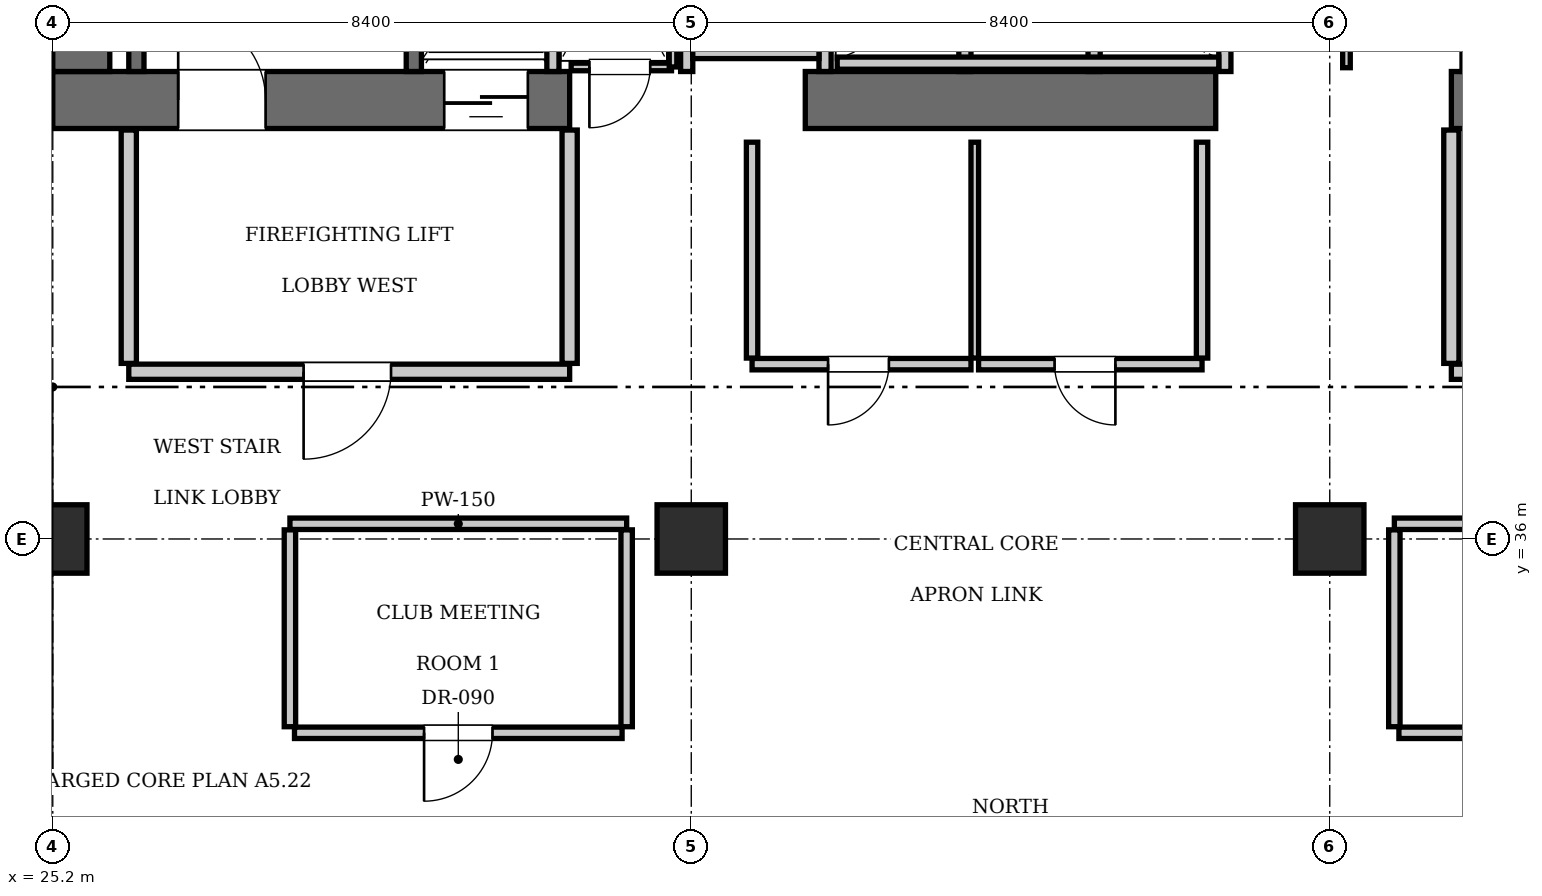
"""IFC4 building model, lengths in metres.
Left out: names, types, materials, properties, quantities, classifications, styles, units other than length and angle.
Written with IfcOpenShell. Run it as: python <this file> out.ifc"""

import sys

from ifc_helpers import new_model, si_unit, direction, frame, frame_2d, origin, origin_2d, place, context, subcontext, project, spatial, rectangle, extrude, element, fill, save


model = new_model("IFC4")
c1 = context("Model", 3, precision=1e-05, world=origin(), true_north=direction((0.0, 1.0)))
c2 = subcontext(c1, "Body", "Model", "MODEL_VIEW")
j1 = project(units=[si_unit("LENGTHUNIT", "METRE"), si_unit("PLANEANGLEUNIT", "RADIAN")], contexts=[c1])
p1 = place(None, origin())
s1 = spatial("IfcSite", under=j1, at=p1, CompositionType="ELEMENT")
p2 = place(p1, origin())
s2 = spatial("IfcBuilding", under=s1, at=p2, CompositionType="ELEMENT")
p3 = place(p2, frame((0.0, 0.0, 146.65)))
s3 = spatial("IfcBuildingStorey", under=s2, at=p3, CompositionType="ELEMENT", Elevation=146.65)
p4 = place(p3, frame((25.2, 41.775, 0.0), z_axis=(0.0, 0.0, 1.0), x_axis=(1.0, 0.0, 0.0)))
e1 = element("IfcWall", 1, at=p4, inside=s3, PredefinedType="SHEAR", context=c2, shape_type="SweptSolid", body=[
    extrude(rectangle(XDim=6.8, YDim=0.75, at=frame_2d((3.4, 0.0))), origin(), (0.0, 0.0, 1.0), 3.85),
])
p5 = place(p4, frame((1.65, 0.0, 0.0)))
e2 = element("IfcOpeningElement", 2, at=p5, cuts=e1, PredefinedType="OPENING", context=c2, shape_type="SweptSolid", body=[
    extrude(rectangle(XDim=1.15, YDim=2.15, at=frame_2d((0.575, 1.075))), frame((0.0, 0.385, 0.0), z_axis=(0.0, -1.0, 0.0), x_axis=(1.0, 0.0, 0.0)), (0.0, 0.0, 1.0), 0.77),
])
p6 = place(p4, frame((5.15, 0.0, 0.0)))
e3 = element("IfcOpeningElement", 3, at=p6, cuts=e1, PredefinedType="OPENING", context=c2, shape_type="SweptSolid", body=[
    extrude(rectangle(XDim=1.1, YDim=2.2, at=frame_2d((0.55, 1.1))), frame((0.0, 0.385, 0.0), z_axis=(0.0, -1.0, 0.0), x_axis=(1.0, 0.0, 0.0)), (0.0, 0.0, 1.0), 0.77),
])
p7 = place(p3, frame((35.1, 41.775, 0.0), z_axis=(0.0, 0.0, 1.0), x_axis=(1.0, 0.0, 0.0)))
e4 = element("IfcWall", 4, at=p7, inside=s3, PredefinedType="SHEAR", context=c2, shape_type="SweptSolid", body=[
    extrude(rectangle(XDim=5.4, YDim=0.75, at=frame_2d((2.7, 0.0))), origin(), (0.0, 0.0, 1.0), 3.85),
])
p8 = place(p3, frame((43.6, 41.775, 0.0), z_axis=(0.0, 0.0, 1.0), x_axis=(1.0, 0.0, 0.0)))
e5 = element("IfcWall", 5, at=p8, inside=s3, PredefinedType="SHEAR", context=c2, shape_type="SweptSolid", body=[
    extrude(rectangle(XDim=6.8, YDim=0.75, at=frame_2d((3.4, 0.0))), origin(), (0.0, 0.0, 1.0), 3.85),
])
p9 = place(p8, frame((3.9, 0.0, 0.0)))
e6 = element("IfcOpeningElement", 6, at=p9, cuts=e5, PredefinedType="OPENING", context=c2, shape_type="SweptSolid", body=[
    extrude(rectangle(XDim=1.15, YDim=2.15, at=frame_2d((0.575, 1.075))), frame((0.0, 0.385, 0.0), z_axis=(0.0, -1.0, 0.0), x_axis=(1.0, 0.0, 0.0)), (0.0, 0.0, 1.0), 0.77),
])
p10 = place(p8, frame((0.55, 0.0, 0.0)))
e7 = element("IfcOpeningElement", 7, at=p10, cuts=e5, PredefinedType="OPENING", context=c2, shape_type="SweptSolid", body=[
    extrude(rectangle(XDim=1.1, YDim=2.2, at=frame_2d((0.55, 1.1))), frame((0.0, 0.385, 0.0), z_axis=(0.0, -1.0, 0.0), x_axis=(1.0, 0.0, 0.0)), (0.0, 0.0, 1.0), 0.77),
])
p11 = place(p3, frame((25.575, 42.15, 0.0), z_axis=(0.0, 0.0, 1.0), x_axis=(0.0, 1.0, 0.0)))
e8 = element("IfcWall", 8, at=p11, inside=s3, PredefinedType="SHEAR", context=c2, shape_type="SweptSolid", body=[
    extrude(rectangle(XDim=1.9, YDim=0.75, at=frame_2d((0.95, 0.0))), origin(), (0.0, 0.0, 1.0), 3.85),
])
for number, where, z_axis, x_axis in (
    (9, (25.2, 36.0, 0.0), (0.0, 0.0, 1.0), (1.0, 0.0, 0.0)),
    (10, (33.6, 36.0, 0.0), (0.0, 0.0, 1.0), (1.0, 0.0, 0.0)),
    (11, (42.0, 36.0, 0.0), (0.0, 0.0, 1.0), (1.0, 0.0, 0.0)),
):
    element("IfcColumn", number, at=place(p3, frame(where, z_axis=z_axis, x_axis=x_axis)), inside=s3, PredefinedType="COLUMN", context=c2, shape_type="SweptSolid", body=[
        extrude(rectangle(XDim=0.9, YDim=0.9, at=origin_2d()), origin(), (0.0, 0.0, 1.0), 3.85),
    ])
p12 = place(p3, frame((29.95, 42.15, 0.0), z_axis=(0.0, 0.0, 1.0), x_axis=(0.0, 1.0, 0.0)))
e12 = element("IfcWall", 12, at=p12, inside=s3, PredefinedType="SOLIDWALL", context=c2, shape_type="SweptSolid", body=[
    extrude(rectangle(XDim=9.0, YDim=0.2, at=frame_2d((4.5, 0.0))), origin(), (0.0, 0.0, 1.0), 3.61),
])
p13 = place(p3, frame((26.3, 42.15, 0.0), z_axis=(0.0, 0.0, 1.0), x_axis=(0.0, 1.0, 0.0)))
e13 = element("IfcWall", 13, at=p13, inside=s3, PredefinedType="SOLIDWALL", context=c2, shape_type="SweptSolid", body=[
    extrude(rectangle(XDim=1.87, YDim=0.2, at=frame_2d((0.935, 0.0))), origin(), (0.0, 0.0, 1.0), 3.61),
])
for number, where, z_axis, x_axis in (
    (14, (31.78, 42.15, 0.0), (0.0, 0.0, 1.0), (0.0, 1.0, 0.0)),
    (15, (43.82, 42.15, 0.0), (0.0, 0.0, 1.0), (0.0, 1.0, 0.0)),
):
    element("IfcWall", number, at=place(p3, frame(where, z_axis=z_axis, x_axis=x_axis)), inside=s3, PredefinedType="SOLIDWALL", context=c2, shape_type="SweptSolid", body=[
        extrude(rectangle(XDim=2.59, YDim=0.16, at=frame_2d((1.295, 0.0))), origin(), (0.0, 0.0, 1.0), 3.61),
    ])
for number, where, z_axis, x_axis in (
    (16, (37.2, 42.15, 0.0), (0.0, 0.0, 1.0), (0.0, 1.0, 0.0)),
    (17, (38.9, 42.15, 0.0), (0.0, 0.0, 1.0), (0.0, 1.0, 0.0)),
    (18, (40.62, 42.15, 0.0), (0.0, 0.0, 1.0), (0.0, 1.0, 0.0)),
):
    element("IfcWall", number, at=place(p3, frame(where, z_axis=z_axis, x_axis=x_axis)), inside=s3, PredefinedType="SOLIDWALL", context=c2, shape_type="SweptSolid", body=[
        extrude(rectangle(XDim=2.2, YDim=0.16, at=frame_2d((1.1, 0.0))), origin(), (0.0, 0.0, 1.0), 3.61),
    ])
p14 = place(p3, frame((35.52, 42.26, 0.0), z_axis=(0.0, 0.0, 1.0), x_axis=(1.0, 0.0, 0.0)))
e19 = element("IfcWall", 19, at=p14, inside=s3, PredefinedType="SOLIDWALL", context=c2, shape_type="SweptSolid", body=[
    extrude(rectangle(XDim=5.02, YDim=0.16, at=frame_2d((2.51, 0.0))), origin(), (0.0, 0.0, 1.0), 3.61),
])
for number, where, z_axis, x_axis in (
    (20, (33.54, 42.15, 0.0), (0.0, 0.0, 1.0), (0.0, 1.0, 0.0)),
    (21, (35.36, 42.15, 0.0), (0.0, 0.0, 1.0), (0.0, 1.0, 0.0)),
):
    element("IfcWall", number, at=place(p3, frame(where, z_axis=z_axis, x_axis=x_axis)), inside=s3, PredefinedType="SOLIDWALL", context=c2, shape_type="SweptSolid", body=[
        extrude(rectangle(XDim=2.25, YDim=0.16, at=frame_2d((1.125, 0.0))), origin(), (0.0, 0.0, 1.0), 3.61),
    ])
p15 = place(p3, frame((33.62, 42.4, 0.0), z_axis=(0.0, 0.0, 1.0), x_axis=(1.0, 0.0, 0.0)))
e22 = element("IfcWall", 22, at=p15, inside=s3, PredefinedType="SOLIDWALL", context=c2, shape_type="SweptSolid", body=[
    extrude(rectangle(XDim=1.66, YDim=0.16, at=frame_2d((0.83, 0.0))), origin(), (0.0, 0.0, 1.0), 3.61),
])
p16 = place(p3, frame((26.2, 38.2, 0.0), z_axis=(0.0, 0.0, 1.0), x_axis=(1.0, 0.0, 0.0)))
e23 = element("IfcWall", 23, at=p16, inside=s3, PredefinedType="PARTITIONING", context=c2, shape_type="SweptSolid", body=[
    extrude(rectangle(XDim=5.8, YDim=0.2, at=frame_2d((2.9, 0.0))), origin(), (0.0, 0.0, 1.0), 3.61),
])
p17 = place(p16, frame((2.3, 0.0, 0.0)))
e24 = element("IfcOpeningElement", 24, at=p17, cuts=e23, PredefinedType="OPENING", context=c2, shape_type="SweptSolid", body=[
    extrude(rectangle(XDim=1.15, YDim=2.15, at=frame_2d((0.575, 1.075))), frame((0.0, 0.11, 0.0), z_axis=(0.0, -1.0, 0.0), x_axis=(1.0, 0.0, 0.0)), (0.0, 0.0, 1.0), 0.22),
])
for number, where, z_axis, x_axis in (
    (25, (26.2, 38.31, 0.0), (0.0, 0.0, 1.0), (0.0, 1.0, 0.0)),
    (26, (32.0, 38.31, 0.0), (0.0, 0.0, 1.0), (0.0, 1.0, 0.0)),
):
    element("IfcWall", number, at=place(p3, frame(where, z_axis=z_axis, x_axis=x_axis)), inside=s3, PredefinedType="PARTITIONING", context=c2, shape_type="SweptSolid", body=[
        extrude(rectangle(XDim=3.07, YDim=0.2, at=frame_2d((1.535, 0.0))), origin(), (0.0, 0.0, 1.0), 3.61),
    ])
p18 = place(p3, frame((43.6, 38.2, 0.0), z_axis=(0.0, 0.0, 1.0), x_axis=(1.0, 0.0, 0.0)))
e27 = element("IfcWall", 27, at=p18, inside=s3, PredefinedType="PARTITIONING", context=c2, shape_type="SweptSolid", body=[
    extrude(rectangle(XDim=5.8, YDim=0.2, at=frame_2d((2.9, 0.0))), origin(), (0.0, 0.0, 1.0), 3.61),
])
p19 = place(p18, frame((2.3, 0.0, 0.0)))
e28 = element("IfcOpeningElement", 28, at=p19, cuts=e27, PredefinedType="OPENING", context=c2, shape_type="SweptSolid", body=[
    extrude(rectangle(XDim=1.15, YDim=2.15, at=frame_2d((0.575, 1.075))), frame((0.0, 0.11, 0.0), z_axis=(0.0, -1.0, 0.0), x_axis=(1.0, 0.0, 0.0)), (0.0, 0.0, 1.0), 0.22),
])
p20 = place(p3, frame((43.6, 38.31, 0.0), z_axis=(0.0, 0.0, 1.0), x_axis=(0.0, 1.0, 0.0)))
e29 = element("IfcWall", 29, at=p20, inside=s3, PredefinedType="PARTITIONING", context=c2, shape_type="SweptSolid", body=[
    extrude(rectangle(XDim=3.07, YDim=0.2, at=frame_2d((1.535, 0.0))), origin(), (0.0, 0.0, 1.0), 3.61),
])
p21 = place(p3, frame((32.02, 42.21, 0.0), z_axis=(0.0, 0.0, 1.0), x_axis=(1.0, 0.0, 0.0)))
e30 = element("IfcWall", 30, at=p21, inside=s3, PredefinedType="PARTITIONING", context=c2, shape_type="SweptSolid", body=[
    extrude(rectangle(XDim=1.32, YDim=0.1, at=frame_2d((0.66, 0.0))), origin(), (0.0, 0.0, 1.0), 3.61),
])
p22 = place(p21, frame((0.24, 0.0, 0.0)))
e31 = element("IfcOpeningElement", 31, at=p22, cuts=e30, PredefinedType="OPENING", context=c2, shape_type="SweptSolid", body=[
    extrude(rectangle(XDim=0.8, YDim=2.05, at=frame_2d((0.4, 1.025))), frame((0.0, 0.06, 0.0), z_axis=(0.0, -1.0, 0.0), x_axis=(1.0, 0.0, 0.0)), (0.0, 0.0, 1.0), 0.12),
])
p23 = place(p3, frame((33.36, 42.21, 0.0), z_axis=(0.0, 0.0, 1.0), x_axis=(0.0, 1.0, 0.0)))
e32 = element("IfcWall", 32, at=p23, inside=s3, PredefinedType="PARTITIONING", context=c2, shape_type="SweptSolid", body=[
    extrude(rectangle(XDim=2.73, YDim=0.1, at=frame_2d((1.365, 0.0))), origin(), (0.0, 0.0, 1.0), 3.61),
])
p24 = place(p3, frame((42.22, 42.2, 0.0), z_axis=(0.0, 0.0, 1.0), x_axis=(0.0, 1.0, 0.0)))
e33 = element("IfcWall", 33, at=p24, inside=s3, PredefinedType="PARTITIONING", context=c2, shape_type="SweptSolid", body=[
    extrude(rectangle(XDim=2.76, YDim=0.1, at=frame_2d((1.38, 0.0))), origin(), (0.0, 0.0, 1.0), 3.61),
])
p25 = place(p24, frame((0.65, 0.0, 0.0)))
e34 = element("IfcOpeningElement", 34, at=p25, cuts=e33, PredefinedType="OPENING", context=c2, shape_type="SweptSolid", body=[
    extrude(rectangle(XDim=0.8, YDim=2.05, at=frame_2d((0.4, 1.025))), frame((0.0, 0.06, 0.0), z_axis=(0.0, -1.0, 0.0), x_axis=(1.0, 0.0, 0.0)), (0.0, 0.0, 1.0), 0.12),
])
p26 = place(p3, frame((34.4, 38.3, 0.0), z_axis=(0.0, 0.0, 1.0), x_axis=(1.0, 0.0, 0.0)))
e35 = element("IfcWall", 35, at=p26, inside=s3, PredefinedType="PARTITIONING", context=c2, shape_type="SweptSolid", body=[
    extrude(rectangle(XDim=2.88, YDim=0.15, at=frame_2d((1.44, 0.0))), origin(), (0.0, 0.0, 1.0), 3.61),
])
p27 = place(p26, frame((1.0, 0.0, 0.0)))
e36 = element("IfcOpeningElement", 36, at=p27, cuts=e35, PredefinedType="OPENING", context=c2, shape_type="SweptSolid", body=[
    extrude(rectangle(XDim=0.8, YDim=2.05, at=frame_2d((0.4, 1.025))), frame((0.0, 0.085, 0.0), z_axis=(0.0, -1.0, 0.0), x_axis=(1.0, 0.0, 0.0)), (0.0, 0.0, 1.0), 0.17),
])
p28 = place(p3, frame((37.38, 38.3, 0.0), z_axis=(0.0, 0.0, 1.0), x_axis=(1.0, 0.0, 0.0)))
e37 = element("IfcWall", 37, at=p28, inside=s3, PredefinedType="PARTITIONING", context=c2, shape_type="SweptSolid", body=[
    extrude(rectangle(XDim=2.94, YDim=0.15, at=frame_2d((1.47, 0.0))), origin(), (0.0, 0.0, 1.0), 3.61),
])
p29 = place(p28, frame((1.0, 0.0, 0.0)))
e38 = element("IfcOpeningElement", 38, at=p29, cuts=e37, PredefinedType="OPENING", context=c2, shape_type="SweptSolid", body=[
    extrude(rectangle(XDim=0.8, YDim=2.05, at=frame_2d((0.4, 1.025))), frame((0.0, 0.085, 0.0), z_axis=(0.0, -1.0, 0.0), x_axis=(1.0, 0.0, 0.0)), (0.0, 0.0, 1.0), 0.17),
])
p30 = place(p3, frame((34.4, 38.38, 0.0), z_axis=(0.0, 0.0, 1.0), x_axis=(0.0, 1.0, 0.0)))
e39 = element("IfcWall", 39, at=p30, inside=s3, PredefinedType="PARTITIONING", context=c2, shape_type="SweptSolid", body=[
    extrude(rectangle(XDim=2.84, YDim=0.15, at=frame_2d((1.42, 0.0))), origin(), (0.0, 0.0, 1.0), 3.61),
])
p31 = place(p3, frame((37.33, 38.38, 0.0), z_axis=(0.0, 0.0, 1.0), x_axis=(0.0, 1.0, 0.0)))
e40 = element("IfcWall", 40, at=p31, inside=s3, PredefinedType="PARTITIONING", context=c2, shape_type="SweptSolid", body=[
    extrude(rectangle(XDim=2.84, YDim=0.1, at=frame_2d((1.42, 0.0))), origin(), (0.0, 0.0, 1.0), 3.61),
])
p32 = place(p3, frame((40.32, 38.38, 0.0), z_axis=(0.0, 0.0, 1.0), x_axis=(0.0, 1.0, 0.0)))
e41 = element("IfcWall", 41, at=p32, inside=s3, PredefinedType="PARTITIONING", context=c2, shape_type="SweptSolid", body=[
    extrude(rectangle(XDim=2.84, YDim=0.15, at=frame_2d((1.42, 0.0))), origin(), (0.0, 0.0, 1.0), 3.61),
])
p33 = place(p3, frame((28.32, 36.2, 0.0), z_axis=(0.0, 0.0, 1.0), x_axis=(1.0, 0.0, 0.0)))
e42 = element("IfcWall", 42, at=p33, inside=s3, PredefinedType="PARTITIONING", context=c2, shape_type="SweptSolid", body=[
    extrude(rectangle(XDim=4.43, YDim=0.15, at=frame_2d((2.215, 0.0))), origin(), (0.0, 0.0, 1.0), 3.61),
])
for number, where, z_axis, x_axis in (
    (43, (28.32, 33.53, 0.0), (0.0, 0.0, 1.0), (0.0, 1.0, 0.0)),
    (44, (32.75, 33.53, 0.0), (0.0, 0.0, 1.0), (0.0, 1.0, 0.0)),
):
    element("IfcWall", number, at=place(p3, frame(where, z_axis=z_axis, x_axis=x_axis)), inside=s3, PredefinedType="PARTITIONING", context=c2, shape_type="SweptSolid", body=[
        extrude(rectangle(XDim=2.59, YDim=0.15, at=frame_2d((1.295, 0.0))), origin(), (0.0, 0.0, 1.0), 3.61),
    ])
p34 = place(p3, frame((28.38, 33.45, 0.0), z_axis=(0.0, 0.0, 1.0), x_axis=(1.0, 0.0, 0.0)))
e45 = element("IfcWall", 45, at=p34, inside=s3, PredefinedType="PARTITIONING", context=c2, shape_type="SweptSolid", body=[
    extrude(rectangle(XDim=4.31, YDim=0.15, at=frame_2d((2.155, 0.0))), origin(), (0.0, 0.0, 1.0), 3.61),
])
p35 = place(p34, frame((1.705, 0.0, 0.0)))
e46 = element("IfcOpeningElement", 46, at=p35, cuts=e45, PredefinedType="OPENING", context=c2, shape_type="SweptSolid", body=[
    extrude(rectangle(XDim=0.9, YDim=2.1, at=frame_2d((0.45, 1.05))), frame((0.0, 0.085, 0.0), z_axis=(0.0, -1.0, 0.0), x_axis=(1.0, 0.0, 0.0)), (0.0, 0.0, 1.0), 0.17),
])
p36 = place(p3, frame((42.85, 36.2, 0.0), z_axis=(0.0, 0.0, 1.0), x_axis=(1.0, 0.0, 0.0)))
e47 = element("IfcWall", 47, at=p36, inside=s3, PredefinedType="PARTITIONING", context=c2, shape_type="SweptSolid", body=[
    extrude(rectangle(XDim=4.43, YDim=0.15, at=frame_2d((2.215, 0.0))), origin(), (0.0, 0.0, 1.0), 3.61),
])
p37 = place(p3, frame((42.85, 33.53, 0.0), z_axis=(0.0, 0.0, 1.0), x_axis=(0.0, 1.0, 0.0)))
e48 = element("IfcWall", 48, at=p37, inside=s3, PredefinedType="PARTITIONING", context=c2, shape_type="SweptSolid", body=[
    extrude(rectangle(XDim=2.59, YDim=0.15, at=frame_2d((1.295, 0.0))), origin(), (0.0, 0.0, 1.0), 3.61),
])
p38 = place(p3, frame((42.91, 33.45, 0.0), z_axis=(0.0, 0.0, 1.0), x_axis=(1.0, 0.0, 0.0)))
e49 = element("IfcWall", 49, at=p38, inside=s3, PredefinedType="PARTITIONING", context=c2, shape_type="SweptSolid", body=[
    extrude(rectangle(XDim=4.31, YDim=0.15, at=frame_2d((2.155, 0.0))), origin(), (0.0, 0.0, 1.0), 3.61),
])
p39 = place(p38, frame((1.705, 0.0, 0.0)))
e50 = element("IfcOpeningElement", 50, at=p39, cuts=e49, PredefinedType="OPENING", context=c2, shape_type="SweptSolid", body=[
    extrude(rectangle(XDim=0.9, YDim=2.1, at=frame_2d((0.45, 1.05))), frame((0.0, 0.085, 0.0), z_axis=(0.0, -1.0, 0.0), x_axis=(1.0, 0.0, 0.0)), (0.0, 0.0, 1.0), 0.17),
])
p40 = place(p5, origin())
e51 = element("IfcDoor", 51, at=p40, inside=s3, OperationType="SINGLE_SWING_LEFT", PredefinedType="DOOR", context=c2, shape_type="SweptSolid", body=[
    extrude(rectangle(XDim=1.15, YDim=2.15, at=frame_2d((0.575, 1.075))), frame((0.0, 0.025, 0.0), z_axis=(0.0, -1.0, 0.0), x_axis=(1.0, 0.0, 0.0)), (0.0, 0.0, 1.0), 0.05),
])
fill(e2, e51)
p41 = place(p6, frame((1.1, 0.0, 0.0), z_axis=(0.0, 0.0, 1.0), x_axis=(-1.0, 0.0, 0.0)))
e52 = element("IfcDoor", 52, at=p41, inside=s3, OperationType="SLIDING_TO_LEFT", PredefinedType="DOOR", context=c2, shape_type="SweptSolid", body=[
    extrude(rectangle(XDim=1.1, YDim=2.2, at=frame_2d((0.55, 1.1))), frame((0.0, 0.025, 0.0), z_axis=(0.0, -1.0, 0.0), x_axis=(1.0, 0.0, 0.0)), (0.0, 0.0, 1.0), 0.05),
])
fill(e3, e52)
p42 = place(p17, frame((1.15, 0.0, 0.0), z_axis=(0.0, 0.0, 1.0), x_axis=(-1.0, 0.0, 0.0)))
e53 = element("IfcDoor", 53, at=p42, inside=s3, OperationType="SINGLE_SWING_RIGHT", PredefinedType="DOOR", context=c2, shape_type="SweptSolid", body=[
    extrude(rectangle(XDim=1.15, YDim=2.15, at=frame_2d((0.575, 1.075))), frame((0.0, 0.025, 0.0), z_axis=(0.0, -1.0, 0.0), x_axis=(1.0, 0.0, 0.0)), (0.0, 0.0, 1.0), 0.05),
])
fill(e24, e53)
p43 = place(p22, frame((0.8, 0.0, 0.0), z_axis=(0.0, 0.0, 1.0), x_axis=(-1.0, 0.0, 0.0)))
e54 = element("IfcDoor", 54, at=p43, inside=s3, OperationType="SINGLE_SWING_RIGHT", PredefinedType="DOOR", context=c2, shape_type="SweptSolid", body=[
    extrude(rectangle(XDim=0.8, YDim=2.05, at=frame_2d((0.4, 1.025))), frame((0.0, 0.025, 0.0), z_axis=(0.0, -1.0, 0.0), x_axis=(1.0, 0.0, 0.0)), (0.0, 0.0, 1.0), 0.05),
])
fill(e31, e54)
p44 = place(p27, frame((0.8, 0.0, 0.0), z_axis=(0.0, 0.0, 1.0), x_axis=(-1.0, 0.0, 0.0)))
e55 = element("IfcDoor", 55, at=p44, inside=s3, OperationType="SINGLE_SWING_RIGHT", PredefinedType="DOOR", context=c2, shape_type="SweptSolid", body=[
    extrude(rectangle(XDim=0.8, YDim=2.05, at=frame_2d((0.4, 1.025))), frame((0.0, 0.025, 0.0), z_axis=(0.0, -1.0, 0.0), x_axis=(1.0, 0.0, 0.0)), (0.0, 0.0, 1.0), 0.05),
])
fill(e36, e55)
p45 = place(p29, frame((0.8, 0.0, 0.0), z_axis=(0.0, 0.0, 1.0), x_axis=(-1.0, 0.0, 0.0)))
e56 = element("IfcDoor", 56, at=p45, inside=s3, OperationType="SINGLE_SWING_LEFT", PredefinedType="DOOR", context=c2, shape_type="SweptSolid", body=[
    extrude(rectangle(XDim=0.8, YDim=2.05, at=frame_2d((0.4, 1.025))), frame((0.0, 0.025, 0.0), z_axis=(0.0, -1.0, 0.0), x_axis=(1.0, 0.0, 0.0)), (0.0, 0.0, 1.0), 0.05),
])
fill(e38, e56)
p46 = place(p35, frame((0.9, 0.0, 0.0), z_axis=(0.0, 0.0, 1.0), x_axis=(-1.0, 0.0, 0.0)))
e57 = element("IfcDoor", 57, at=p46, inside=s3, OperationType="SINGLE_SWING_RIGHT", PredefinedType="DOOR", context=c2, shape_type="SweptSolid", body=[
    extrude(rectangle(XDim=0.9, YDim=2.1, at=frame_2d((0.45, 1.05))), frame((0.0, 0.025, 0.0), z_axis=(0.0, -1.0, 0.0), x_axis=(1.0, 0.0, 0.0)), (0.0, 0.0, 1.0), 0.05),
])
fill(e46, e57)
save(model, sys.argv[1])
